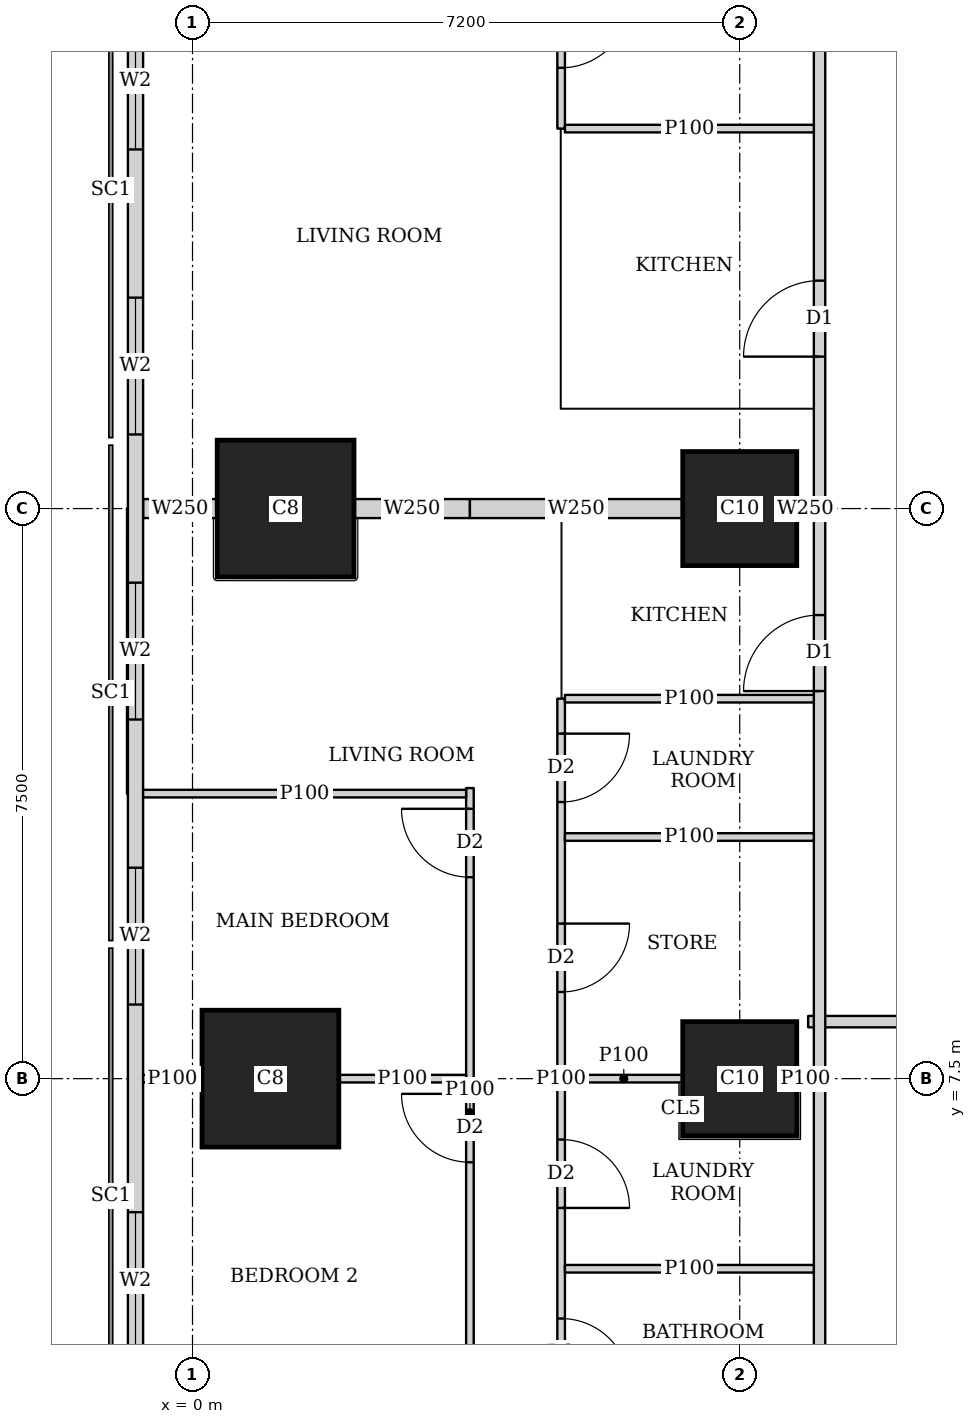
"""IFC4 building model, lengths in metres.
Left out: names, types, materials, properties, quantities, classifications, styles, units other than length and angle.
Written with IfcOpenShell. Run it as: python <this file> out.ifc"""

import sys

from ifc_helpers import new_model, si_unit, direction, frame, frame_2d, origin, origin_2d, place, context, subcontext, project, spatial, rectangle, extrude, element, fill, save


model = new_model("IFC4")
c1 = context("Model", 3, precision=1e-05, world=origin(), true_north=direction((0.0, 1.0)))
c2 = subcontext(c1, "Body", "Model", "MODEL_VIEW")
j1 = project(units=[si_unit("LENGTHUNIT", "METRE"), si_unit("PLANEANGLEUNIT", "RADIAN")], contexts=[c1])
p1 = place(None, origin())
s1 = spatial("IfcSite", under=j1, at=p1, CompositionType="ELEMENT")
p2 = place(p1, origin())
s2 = spatial("IfcBuilding", under=s1, at=p2, CompositionType="ELEMENT")
p3 = place(p2, frame((0.0, 0.0, 169.55)))
s3 = spatial("IfcBuildingStorey", under=s2, at=p3, CompositionType="ELEMENT", Elevation=169.55)
p4 = place(p3, frame((1.025, 7.5, 0.0), z_axis=(0.0, 0.0, 1.0), x_axis=(1.0, 0.0, 0.0)))
e1 = element("IfcColumn", 1, at=p4, inside=s3, PredefinedType="COLUMN", context=c2, shape_type="SweptSolid", body=[
    extrude(rectangle(XDim=1.8, YDim=1.8, at=origin_2d()), origin(), (0.0, 0.0, 1.0), 3.75),
])
p5 = place(p3, frame((7.2, 7.5, 0.0), z_axis=(0.0, 0.0, 1.0), x_axis=(1.0, 0.0, 0.0)))
e2 = element("IfcColumn", 2, at=p5, inside=s3, PredefinedType="COLUMN", context=c2, shape_type="SweptSolid", body=[
    extrude(rectangle(XDim=1.5, YDim=1.5, at=origin_2d()), origin(), (0.0, 0.0, 1.0), 3.75),
])
p6 = place(p3, frame((1.225, 15.0, 0.0), z_axis=(0.0, 0.0, 1.0), x_axis=(1.0, 0.0, 0.0)))
e3 = element("IfcColumn", 3, at=p6, inside=s3, PredefinedType="COLUMN", context=c2, shape_type="SweptSolid", body=[
    extrude(rectangle(XDim=1.8, YDim=1.8, at=origin_2d()), origin(), (0.0, 0.0, 1.0), 3.75),
])
p7 = place(p3, frame((7.2, 15.0, 0.0), z_axis=(0.0, 0.0, 1.0), x_axis=(1.0, 0.0, 0.0)))
e4 = element("IfcColumn", 4, at=p7, inside=s3, PredefinedType="COLUMN", context=c2, shape_type="SweptSolid", body=[
    extrude(rectangle(XDim=1.5, YDim=1.5, at=origin_2d()), origin(), (0.0, 0.0, 1.0), 3.75),
])
p8 = place(p3, frame((-0.75, 42.837, 0.0), z_axis=(0.0, 0.0, 1.0), x_axis=(0.0, -1.0, 0.0)))
e5 = element("IfcWall", 5, at=p8, inside=s3, PredefinedType="SOLIDWALL", context=c2, shape_type="SweptSolid", body=[
    extrude(rectangle(XDim=40.674, YDim=0.2, at=frame_2d((20.337, 0.0))), origin(), (0.0, 0.0, 1.0), 3.5),
])
p9 = place(p8, frame((1.78, 0.0, 0.9)))
e6 = element("IfcOpeningElement", 6, at=p9, cuts=e5, PredefinedType="OPENING", context=c2, shape_type="SweptSolid", body=[
    extrude(rectangle(XDim=1.8, YDim=1.5, at=frame_2d((0.9, 0.75))), frame((0.0, 0.11, 0.0), z_axis=(0.0, -1.0, 0.0), x_axis=(1.0, 0.0, 0.0)), (0.0, 0.0, 1.0), 0.22),
])
p10 = place(p8, frame((6.312, 0.0, 0.9)))
e7 = element("IfcOpeningElement", 7, at=p10, cuts=e5, PredefinedType="OPENING", context=c2, shape_type="SweptSolid", body=[
    extrude(rectangle(XDim=1.8, YDim=1.5, at=frame_2d((0.9, 0.75))), frame((0.0, 0.11, 0.0), z_axis=(0.0, -1.0, 0.0), x_axis=(1.0, 0.0, 0.0)), (0.0, 0.0, 1.0), 0.22),
])
p11 = place(p8, frame((10.062, 0.0, 0.9)))
e8 = element("IfcOpeningElement", 8, at=p11, cuts=e5, PredefinedType="OPENING", context=c2, shape_type="SweptSolid", body=[
    extrude(rectangle(XDim=1.8, YDim=1.5, at=frame_2d((0.9, 0.75))), frame((0.0, 0.11, 0.0), z_axis=(0.0, -1.0, 0.0), x_axis=(1.0, 0.0, 0.0)), (0.0, 0.0, 1.0), 0.22),
])
p12 = place(p8, frame((13.812, 0.0, 0.9)))
e9 = element("IfcOpeningElement", 9, at=p12, cuts=e5, PredefinedType="OPENING", context=c2, shape_type="SweptSolid", body=[
    extrude(rectangle(XDim=1.8, YDim=1.5, at=frame_2d((0.9, 0.75))), frame((0.0, 0.11, 0.0), z_axis=(0.0, -1.0, 0.0), x_axis=(1.0, 0.0, 0.0)), (0.0, 0.0, 1.0), 0.22),
])
p13 = place(p8, frame((17.562, 0.0, 0.9)))
e10 = element("IfcOpeningElement", 10, at=p13, cuts=e5, PredefinedType="OPENING", context=c2, shape_type="SweptSolid", body=[
    extrude(rectangle(XDim=1.8, YDim=1.5, at=frame_2d((0.9, 0.75))), frame((0.0, 0.11, 0.0), z_axis=(0.0, -1.0, 0.0), x_axis=(1.0, 0.0, 0.0)), (0.0, 0.0, 1.0), 0.22),
])
p14 = place(p8, frame((21.312, 0.0, 0.9)))
e11 = element("IfcOpeningElement", 11, at=p14, cuts=e5, PredefinedType="OPENING", context=c2, shape_type="SweptSolid", body=[
    extrude(rectangle(XDim=1.8, YDim=1.5, at=frame_2d((0.9, 0.75))), frame((0.0, 0.11, 0.0), z_axis=(0.0, -1.0, 0.0), x_axis=(1.0, 0.0, 0.0)), (0.0, 0.0, 1.0), 0.22),
])
p15 = place(p8, frame((25.062, 0.0, 0.9)))
e12 = element("IfcOpeningElement", 12, at=p15, cuts=e5, PredefinedType="OPENING", context=c2, shape_type="SweptSolid", body=[
    extrude(rectangle(XDim=1.8, YDim=1.5, at=frame_2d((0.9, 0.75))), frame((0.0, 0.11, 0.0), z_axis=(0.0, -1.0, 0.0), x_axis=(1.0, 0.0, 0.0)), (0.0, 0.0, 1.0), 0.22),
])
p16 = place(p8, frame((28.812, 0.0, 0.9)))
e13 = element("IfcOpeningElement", 13, at=p16, cuts=e5, PredefinedType="OPENING", context=c2, shape_type="SweptSolid", body=[
    extrude(rectangle(XDim=1.8, YDim=1.5, at=frame_2d((0.9, 0.75))), frame((0.0, 0.11, 0.0), z_axis=(0.0, -1.0, 0.0), x_axis=(1.0, 0.0, 0.0)), (0.0, 0.0, 1.0), 0.22),
])
p17 = place(p8, frame((32.562, 0.0, 0.9)))
e14 = element("IfcOpeningElement", 14, at=p17, cuts=e5, PredefinedType="OPENING", context=c2, shape_type="SweptSolid", body=[
    extrude(rectangle(XDim=1.8, YDim=1.5, at=frame_2d((0.9, 0.75))), frame((0.0, 0.11, 0.0), z_axis=(0.0, -1.0, 0.0), x_axis=(1.0, 0.0, 0.0)), (0.0, 0.0, 1.0), 0.22),
])
p18 = place(p8, frame((37.094, 0.0, 0.9)))
e15 = element("IfcOpeningElement", 15, at=p18, cuts=e5, PredefinedType="OPENING", context=c2, shape_type="SweptSolid", body=[
    extrude(rectangle(XDim=1.8, YDim=1.5, at=frame_2d((0.9, 0.75))), frame((0.0, 0.11, 0.0), z_axis=(0.0, -1.0, 0.0), x_axis=(1.0, 0.0, 0.0)), (0.0, 0.0, 1.0), 0.22),
])
p19 = place(p3, frame((8.25, 1.957, 0.0), z_axis=(0.0, 0.0, 1.0), x_axis=(0.0, 1.0, 0.0)))
e16 = element("IfcWall", 16, at=p19, inside=s3, PredefinedType="SOLIDWALL", context=c2, shape_type="SweptSolid", body=[
    extrude(rectangle(XDim=41.111, YDim=0.15, at=frame_2d((20.556, 0.0))), origin(), (0.0, 0.0, 1.0), 3.5),
])
p20 = place(p19, frame((10.642, 0.0, 0.0)))
e17 = element("IfcOpeningElement", 17, at=p20, cuts=e16, PredefinedType="OPENING", context=c2, shape_type="SweptSolid", body=[
    extrude(rectangle(XDim=1.0, YDim=2.1, at=frame_2d((0.5, 1.05))), frame((0.0, 0.085, 0.0), z_axis=(0.0, -1.0, 0.0), x_axis=(1.0, 0.0, 0.0)), (0.0, 0.0, 1.0), 0.17),
])
p21 = place(p19, frame((15.042, 0.0, 0.0)))
e18 = element("IfcOpeningElement", 18, at=p21, cuts=e16, PredefinedType="OPENING", context=c2, shape_type="SweptSolid", body=[
    extrude(rectangle(XDim=1.0, YDim=2.1, at=frame_2d((0.5, 1.05))), frame((0.0, 0.085, 0.0), z_axis=(0.0, -1.0, 0.0), x_axis=(1.0, 0.0, 0.0)), (0.0, 0.0, 1.0), 0.17),
])
p22 = place(p19, frame((22.543, 0.0, 0.0)))
e19 = element("IfcOpeningElement", 19, at=p22, cuts=e16, PredefinedType="OPENING", context=c2, shape_type="SweptSolid", body=[
    extrude(rectangle(XDim=1.0, YDim=2.1, at=frame_2d((0.5, 1.05))), frame((0.0, 0.085, 0.0), z_axis=(0.0, -1.0, 0.0), x_axis=(1.0, 0.0, 0.0)), (0.0, 0.0, 1.0), 0.17),
])
p23 = place(p19, frame((33.142, 0.0, 0.0)))
e20 = element("IfcOpeningElement", 20, at=p23, cuts=e16, PredefinedType="OPENING", context=c2, shape_type="SweptSolid", body=[
    extrude(rectangle(XDim=1.0, YDim=2.1, at=frame_2d((0.5, 1.05))), frame((0.0, 0.085, 0.0), z_axis=(0.0, -1.0, 0.0), x_axis=(1.0, 0.0, 0.0)), (0.0, 0.0, 1.0), 0.17),
])
p24 = place(p3, frame((13.649, 8.25, 0.0), z_axis=(0.0, 0.0, 1.0), x_axis=(-1.0, 0.0, 0.0)))
e21 = element("IfcWall", 21, at=p24, inside=s3, PredefinedType="SOLIDWALL", context=c2, shape_type="SweptSolid", body=[
    extrude(rectangle(XDim=5.549, YDim=0.15, at=frame_2d((2.774, 0.0))), origin(), (0.0, 0.0, 1.0), 3.5),
])
p25 = place(p24, frame((1.824, 0.0, 0.0)))
e22 = element("IfcOpeningElement", 22, at=p25, cuts=e21, PredefinedType="OPENING", context=c2, shape_type="SweptSolid", body=[
    extrude(rectangle(XDim=1.0, YDim=2.1, at=frame_2d((0.5, 1.05))), frame((0.0, 0.085, 0.0), z_axis=(0.0, -1.0, 0.0), x_axis=(1.0, 0.0, 0.0)), (0.0, 0.0, 1.0), 0.17),
])
p26 = place(p3, frame((3.65, 2.782, 0.0), z_axis=(0.0, 0.0, 1.0), x_axis=(0.0, 1.0, 0.0)))
e23 = element("IfcWall", 23, at=p26, inside=s3, PredefinedType="PARTITIONING", context=c2, shape_type="SweptSolid", body=[
    extrude(rectangle(XDim=8.541, YDim=0.1, at=frame_2d((4.271, 0.0))), origin(), (0.0, 0.0, 1.0), 3.5),
])
p27 = place(p26, frame((7.368, 0.0, 0.0)))
e24 = element("IfcOpeningElement", 24, at=p27, cuts=e23, PredefinedType="OPENING", context=c2, shape_type="SweptSolid", body=[
    extrude(rectangle(XDim=0.9, YDim=2.1, at=frame_2d((0.45, 1.05))), frame((0.0, 0.06, 0.0), z_axis=(0.0, -1.0, 0.0), x_axis=(1.0, 0.0, 0.0)), (0.0, 0.0, 1.0), 0.12),
])
p28 = place(p26, frame((3.618, 0.0, 0.0)))
e25 = element("IfcOpeningElement", 25, at=p28, cuts=e23, PredefinedType="OPENING", context=c2, shape_type="SweptSolid", body=[
    extrude(rectangle(XDim=0.9, YDim=2.1, at=frame_2d((0.45, 1.05))), frame((0.0, 0.06, 0.0), z_axis=(0.0, -1.0, 0.0), x_axis=(1.0, 0.0, 0.0)), (0.0, 0.0, 1.0), 0.12),
])
p29 = place(p3, frame((4.85, 2.505, 0.0), z_axis=(0.0, 0.0, 1.0), x_axis=(0.0, 1.0, 0.0)))
e26 = element("IfcWall", 26, at=p29, inside=s3, PredefinedType="PARTITIONING", context=c2, shape_type="SweptSolid", body=[
    extrude(rectangle(XDim=9.994, YDim=0.1, at=frame_2d((4.997, 0.0))), origin(), (0.0, 0.0, 1.0), 3.5),
])
p30 = place(p29, frame((8.634, 0.0, 0.0)))
e27 = element("IfcOpeningElement", 27, at=p30, cuts=e26, PredefinedType="OPENING", context=c2, shape_type="SweptSolid", body=[
    extrude(rectangle(XDim=0.9, YDim=2.1, at=frame_2d((0.45, 1.05))), frame((0.0, 0.06, 0.0), z_axis=(0.0, -1.0, 0.0), x_axis=(1.0, 0.0, 0.0)), (0.0, 0.0, 1.0), 0.12),
])
p31 = place(p29, frame((3.294, 0.0, 0.0)))
e28 = element("IfcOpeningElement", 28, at=p31, cuts=e26, PredefinedType="OPENING", context=c2, shape_type="SweptSolid", body=[
    extrude(rectangle(XDim=0.9, YDim=2.1, at=frame_2d((0.45, 1.05))), frame((0.0, 0.06, 0.0), z_axis=(0.0, -1.0, 0.0), x_axis=(1.0, 0.0, 0.0)), (0.0, 0.0, 1.0), 0.12),
])
p32 = place(p29, frame((0.939, 0.0, 0.0)))
e29 = element("IfcOpeningElement", 29, at=p32, cuts=e26, PredefinedType="OPENING", context=c2, shape_type="SweptSolid", body=[
    extrude(rectangle(XDim=0.9, YDim=2.1, at=frame_2d((0.45, 1.05))), frame((0.0, 0.06, 0.0), z_axis=(0.0, -1.0, 0.0), x_axis=(1.0, 0.0, 0.0)), (0.0, 0.0, 1.0), 0.12),
])
p33 = place(p29, frame((6.135, 0.0, 0.0)))
e30 = element("IfcOpeningElement", 30, at=p33, cuts=e26, PredefinedType="OPENING", context=c2, shape_type="SweptSolid", body=[
    extrude(rectangle(XDim=0.9, YDim=2.1, at=frame_2d((0.45, 1.05))), frame((0.0, 0.06, 0.0), z_axis=(0.0, -1.0, 0.0), x_axis=(1.0, 0.0, 0.0)), (0.0, 0.0, 1.0), 0.12),
])
p34 = place(p3, frame((-0.65, 7.5, 0.0), z_axis=(0.0, 0.0, 1.0), x_axis=(1.0, 0.0, 0.0)))
e31 = element("IfcWall", 31, at=p34, inside=s3, PredefinedType="PARTITIONING", context=c2, shape_type="SweptSolid", body=[
    extrude(rectangle(XDim=0.774, YDim=0.1, at=frame_2d((0.387, 0.0))), origin(), (0.0, 0.0, 1.0), 3.5),
])
p35 = place(p3, frame((1.926, 7.5, 0.0), z_axis=(0.0, 0.0, 1.0), x_axis=(1.0, 0.0, 0.0)))
e32 = element("IfcWall", 32, at=p35, inside=s3, PredefinedType="PARTITIONING", context=c2, shape_type="SweptSolid", body=[
    extrude(rectangle(XDim=1.674, YDim=0.1, at=frame_2d((0.837, 0.0))), origin(), (0.0, 0.0, 1.0), 2.1),
])
p36 = place(p3, frame((-0.65, 11.25, 0.0), z_axis=(0.0, 0.0, 1.0), x_axis=(1.0, 0.0, 0.0)))
e33 = element("IfcWall", 33, at=p36, inside=s3, PredefinedType="PARTITIONING", context=c2, shape_type="SweptSolid", body=[
    extrude(rectangle(XDim=4.25, YDim=0.1, at=frame_2d((2.125, 0.0))), origin(), (0.0, 0.0, 1.0), 2.1),
])
p37 = place(p3, frame((4.9, 4.999, 0.0), z_axis=(0.0, 0.0, 1.0), x_axis=(1.0, 0.0, 0.0)))
e34 = element("IfcWall", 34, at=p37, inside=s3, PredefinedType="PARTITIONING", context=c2, shape_type="SweptSolid", body=[
    extrude(rectangle(XDim=3.275, YDim=0.1, at=frame_2d((1.638, 0.0))), origin(), (0.0, 0.0, 1.0), 3.5),
])
p38 = place(p3, frame((4.9, 7.5, 0.0), z_axis=(0.0, 0.0, 1.0), x_axis=(1.0, 0.0, 0.0)))
e35 = element("IfcWall", 35, at=p38, inside=s3, PredefinedType="PARTITIONING", context=c2, shape_type="SweptSolid", body=[
    extrude(rectangle(XDim=1.549, YDim=0.1, at=frame_2d((0.774, 0.0))), origin(), (0.0, 0.0, 1.0), 3.5),
])
p39 = place(p3, frame((7.951, 7.5, 0.0), z_axis=(0.0, 0.0, 1.0), x_axis=(1.0, 0.0, 0.0)))
e36 = element("IfcWall", 36, at=p39, inside=s3, PredefinedType="PARTITIONING", context=c2, shape_type="SweptSolid", body=[
    extrude(rectangle(XDim=0.224, YDim=0.1, at=frame_2d((0.112, 0.0))), origin(), (0.0, 0.0, 1.0), 3.5),
])
for number, where, z_axis, x_axis in (
    (37, (4.9, 12.499, 0.0), (0.0, 0.0, 1.0), (1.0, 0.0, 0.0)),
    (38, (4.9, 10.679, 0.0), (0.0, 0.0, 1.0), (1.0, 0.0, 0.0)),
):
    element("IfcWall", number, at=place(p3, frame(where, z_axis=z_axis, x_axis=x_axis)), inside=s3, PredefinedType="PARTITIONING", context=c2, shape_type="SweptSolid", body=[
        extrude(rectangle(XDim=3.275, YDim=0.1, at=frame_2d((1.638, 0.0))), origin(), (0.0, 0.0, 1.0), 3.5),
    ])
p40 = place(p3, frame((4.85, 19.999, 0.0), z_axis=(0.0, 0.0, 1.0), x_axis=(0.0, 1.0, 0.0)))
e39 = element("IfcWall", 39, at=p40, inside=s3, PredefinedType="PARTITIONING", context=c2, shape_type="SweptSolid", body=[
    extrude(rectangle(XDim=2.376, YDim=0.1, at=frame_2d((1.188, 0.0))), origin(), (0.0, 0.0, 1.0), 3.5),
])
p41 = place(p40, frame((0.8, 0.0, 0.0)))
e40 = element("IfcOpeningElement", 40, at=p41, cuts=e39, PredefinedType="OPENING", context=c2, shape_type="SweptSolid", body=[
    extrude(rectangle(XDim=0.9, YDim=2.1, at=frame_2d((0.45, 1.05))), frame((0.0, 0.06, 0.0), z_axis=(0.0, -1.0, 0.0), x_axis=(1.0, 0.0, 0.0)), (0.0, 0.0, 1.0), 0.12),
])
p42 = place(p3, frame((4.9, 19.999, 0.0), z_axis=(0.0, 0.0, 1.0), x_axis=(1.0, 0.0, 0.0)))
e41 = element("IfcWall", 41, at=p42, inside=s3, PredefinedType="PARTITIONING", context=c2, shape_type="SweptSolid", body=[
    extrude(rectangle(XDim=3.275, YDim=0.1, at=frame_2d((1.638, 0.0))), origin(), (0.0, 0.0, 1.0), 3.5),
])
p43 = place(p3, frame((-0.65, 15.0, 0.0), z_axis=(0.0, 0.0, 1.0), x_axis=(1.0, 0.0, 0.0)))
e42 = element("IfcWall", 42, at=p43, inside=s3, PredefinedType="SOLIDWALL", context=c2, shape_type="SweptSolid", body=[
    extrude(rectangle(XDim=0.974, YDim=0.25, at=frame_2d((0.487, 0.0))), origin(), (0.0, 0.0, 1.0), 2.1),
])
p44 = place(p3, frame((2.126, 15.0, 0.0), z_axis=(0.0, 0.0, 1.0), x_axis=(1.0, 0.0, 0.0)))
e43 = element("IfcWall", 43, at=p44, inside=s3, PredefinedType="SOLIDWALL", context=c2, shape_type="SweptSolid", body=[
    extrude(rectangle(XDim=1.524, YDim=0.25, at=frame_2d((0.762, 0.0))), origin(), (0.0, 0.0, 1.0), 2.1),
])
p45 = place(p3, frame((3.65, 15.0, 0.0), z_axis=(0.0, 0.0, 1.0), x_axis=(1.0, 0.0, 0.0)))
e44 = element("IfcWall", 44, at=p45, inside=s3, PredefinedType="SOLIDWALL", context=c2, shape_type="SweptSolid", body=[
    extrude(rectangle(XDim=2.799, YDim=0.25, at=frame_2d((1.399, 0.0))), origin(), (0.0, 0.0, 1.0), 3.5),
])
p46 = place(p3, frame((7.951, 15.0, 0.0), z_axis=(0.0, 0.0, 1.0), x_axis=(1.0, 0.0, 0.0)))
e45 = element("IfcWall", 45, at=p46, inside=s3, PredefinedType="SOLIDWALL", context=c2, shape_type="SweptSolid", body=[
    extrude(rectangle(XDim=0.224, YDim=0.25, at=frame_2d((0.112, 0.0))), origin(), (0.0, 0.0, 1.0), 3.5),
])
p47 = place(p14, origin())
e46 = element("IfcWindow", 46, at=p47, inside=s3, PartitioningType="SINGLE_PANEL", PredefinedType="WINDOW", context=c2, shape_type="SweptSolid", body=[
    extrude(rectangle(XDim=1.8, YDim=1.5, at=frame_2d((0.9, 0.75))), frame((0.0, 0.03, 0.0), z_axis=(0.0, -1.0, 0.0), x_axis=(1.0, 0.0, 0.0)), (0.0, 0.0, 1.0), 0.06),
])
fill(e11, e46)
p48 = place(p15, origin())
e47 = element("IfcWindow", 47, at=p48, inside=s3, PartitioningType="SINGLE_PANEL", PredefinedType="WINDOW", context=c2, shape_type="SweptSolid", body=[
    extrude(rectangle(XDim=1.8, YDim=1.5, at=frame_2d((0.9, 0.75))), frame((0.0, 0.03, 0.0), z_axis=(0.0, -1.0, 0.0), x_axis=(1.0, 0.0, 0.0)), (0.0, 0.0, 1.0), 0.06),
])
fill(e12, e47)
p49 = place(p16, origin())
e48 = element("IfcWindow", 48, at=p49, inside=s3, PartitioningType="SINGLE_PANEL", PredefinedType="WINDOW", context=c2, shape_type="SweptSolid", body=[
    extrude(rectangle(XDim=1.8, YDim=1.5, at=frame_2d((0.9, 0.75))), frame((0.0, 0.03, 0.0), z_axis=(0.0, -1.0, 0.0), x_axis=(1.0, 0.0, 0.0)), (0.0, 0.0, 1.0), 0.06),
])
fill(e13, e48)
p50 = place(p17, origin())
e49 = element("IfcWindow", 49, at=p50, inside=s3, PartitioningType="SINGLE_PANEL", PredefinedType="WINDOW", context=c2, shape_type="SweptSolid", body=[
    extrude(rectangle(XDim=1.8, YDim=1.5, at=frame_2d((0.9, 0.75))), frame((0.0, 0.03, 0.0), z_axis=(0.0, -1.0, 0.0), x_axis=(1.0, 0.0, 0.0)), (0.0, 0.0, 1.0), 0.06),
])
fill(e14, e49)
p51 = place(p18, origin())
e50 = element("IfcWindow", 50, at=p51, inside=s3, PartitioningType="SINGLE_PANEL", PredefinedType="WINDOW", context=c2, shape_type="SweptSolid", body=[
    extrude(rectangle(XDim=1.8, YDim=1.5, at=frame_2d((0.9, 0.75))), frame((0.0, 0.03, 0.0), z_axis=(0.0, -1.0, 0.0), x_axis=(1.0, 0.0, 0.0)), (0.0, 0.0, 1.0), 0.06),
])
fill(e15, e50)
p52 = place(p27, origin())
e51 = element("IfcDoor", 51, at=p52, inside=s3, OperationType="SINGLE_SWING_RIGHT", PredefinedType="DOOR", context=c2, shape_type="SweptSolid", body=[
    extrude(rectangle(XDim=0.9, YDim=2.1, at=frame_2d((0.45, 1.05))), frame((0.0, 0.025, 0.0), z_axis=(0.0, -1.0, 0.0), x_axis=(1.0, 0.0, 0.0)), (0.0, 0.0, 1.0), 0.05),
])
fill(e24, e51)
p53 = place(p28, origin())
e52 = element("IfcDoor", 52, at=p53, inside=s3, OperationType="SINGLE_SWING_RIGHT", PredefinedType="DOOR", context=c2, shape_type="SweptSolid", body=[
    extrude(rectangle(XDim=0.9, YDim=2.1, at=frame_2d((0.45, 1.05))), frame((0.0, 0.025, 0.0), z_axis=(0.0, -1.0, 0.0), x_axis=(1.0, 0.0, 0.0)), (0.0, 0.0, 1.0), 0.05),
])
fill(e25, e52)
p54 = place(p30, origin())
e53 = element("IfcDoor", 53, at=p54, inside=s3, OperationType="SINGLE_SWING_LEFT", PredefinedType="DOOR", context=c2, shape_type="SweptSolid", body=[
    extrude(rectangle(XDim=0.9, YDim=2.1, at=frame_2d((0.45, 1.05))), frame((0.0, 0.025, 0.0), z_axis=(0.0, -1.0, 0.0), x_axis=(1.0, 0.0, 0.0)), (0.0, 0.0, 1.0), 0.05),
])
fill(e27, e53)
p55 = place(p31, origin())
e54 = element("IfcDoor", 54, at=p55, inside=s3, OperationType="SINGLE_SWING_RIGHT", PredefinedType="DOOR", context=c2, shape_type="SweptSolid", body=[
    extrude(rectangle(XDim=0.9, YDim=2.1, at=frame_2d((0.45, 1.05))), frame((0.0, 0.025, 0.0), z_axis=(0.0, -1.0, 0.0), x_axis=(1.0, 0.0, 0.0)), (0.0, 0.0, 1.0), 0.05),
])
fill(e28, e54)
p56 = place(p32, origin())
e55 = element("IfcDoor", 55, at=p56, inside=s3, OperationType="SINGLE_SWING_RIGHT", PredefinedType="DOOR", context=c2, shape_type="SweptSolid", body=[
    extrude(rectangle(XDim=0.9, YDim=2.1, at=frame_2d((0.45, 1.05))), frame((0.0, 0.025, 0.0), z_axis=(0.0, -1.0, 0.0), x_axis=(1.0, 0.0, 0.0)), (0.0, 0.0, 1.0), 0.05),
])
fill(e29, e55)
p57 = place(p33, origin())
e56 = element("IfcDoor", 56, at=p57, inside=s3, OperationType="SINGLE_SWING_LEFT", PredefinedType="DOOR", context=c2, shape_type="SweptSolid", body=[
    extrude(rectangle(XDim=0.9, YDim=2.1, at=frame_2d((0.45, 1.05))), frame((0.0, 0.025, 0.0), z_axis=(0.0, -1.0, 0.0), x_axis=(1.0, 0.0, 0.0)), (0.0, 0.0, 1.0), 0.05),
])
fill(e30, e56)
p58 = place(p20, origin())
e57 = element("IfcDoor", 57, at=p58, inside=s3, OperationType="SINGLE_SWING_LEFT", PredefinedType="DOOR", context=c2, shape_type="SweptSolid", body=[
    extrude(rectangle(XDim=1.0, YDim=2.1, at=frame_2d((0.5, 1.05))), frame((0.0, 0.025, 0.0), z_axis=(0.0, -1.0, 0.0), x_axis=(1.0, 0.0, 0.0)), (0.0, 0.0, 1.0), 0.05),
])
fill(e17, e57)
p59 = place(p41, origin())
e58 = element("IfcDoor", 58, at=p59, inside=s3, OperationType="SINGLE_SWING_LEFT", PredefinedType="DOOR", context=c2, shape_type="SweptSolid", body=[
    extrude(rectangle(XDim=0.9, YDim=2.1, at=frame_2d((0.45, 1.05))), frame((0.0, 0.025, 0.0), z_axis=(0.0, -1.0, 0.0), x_axis=(1.0, 0.0, 0.0)), (0.0, 0.0, 1.0), 0.05),
])
fill(e40, e58)
p60 = place(p21, origin())
e59 = element("IfcDoor", 59, at=p60, inside=s3, OperationType="SINGLE_SWING_LEFT", PredefinedType="DOOR", context=c2, shape_type="SweptSolid", body=[
    extrude(rectangle(XDim=1.0, YDim=2.1, at=frame_2d((0.5, 1.05))), frame((0.0, 0.025, 0.0), z_axis=(0.0, -1.0, 0.0), x_axis=(1.0, 0.0, 0.0)), (0.0, 0.0, 1.0), 0.05),
])
fill(e18, e59)
save(model, sys.argv[1])
